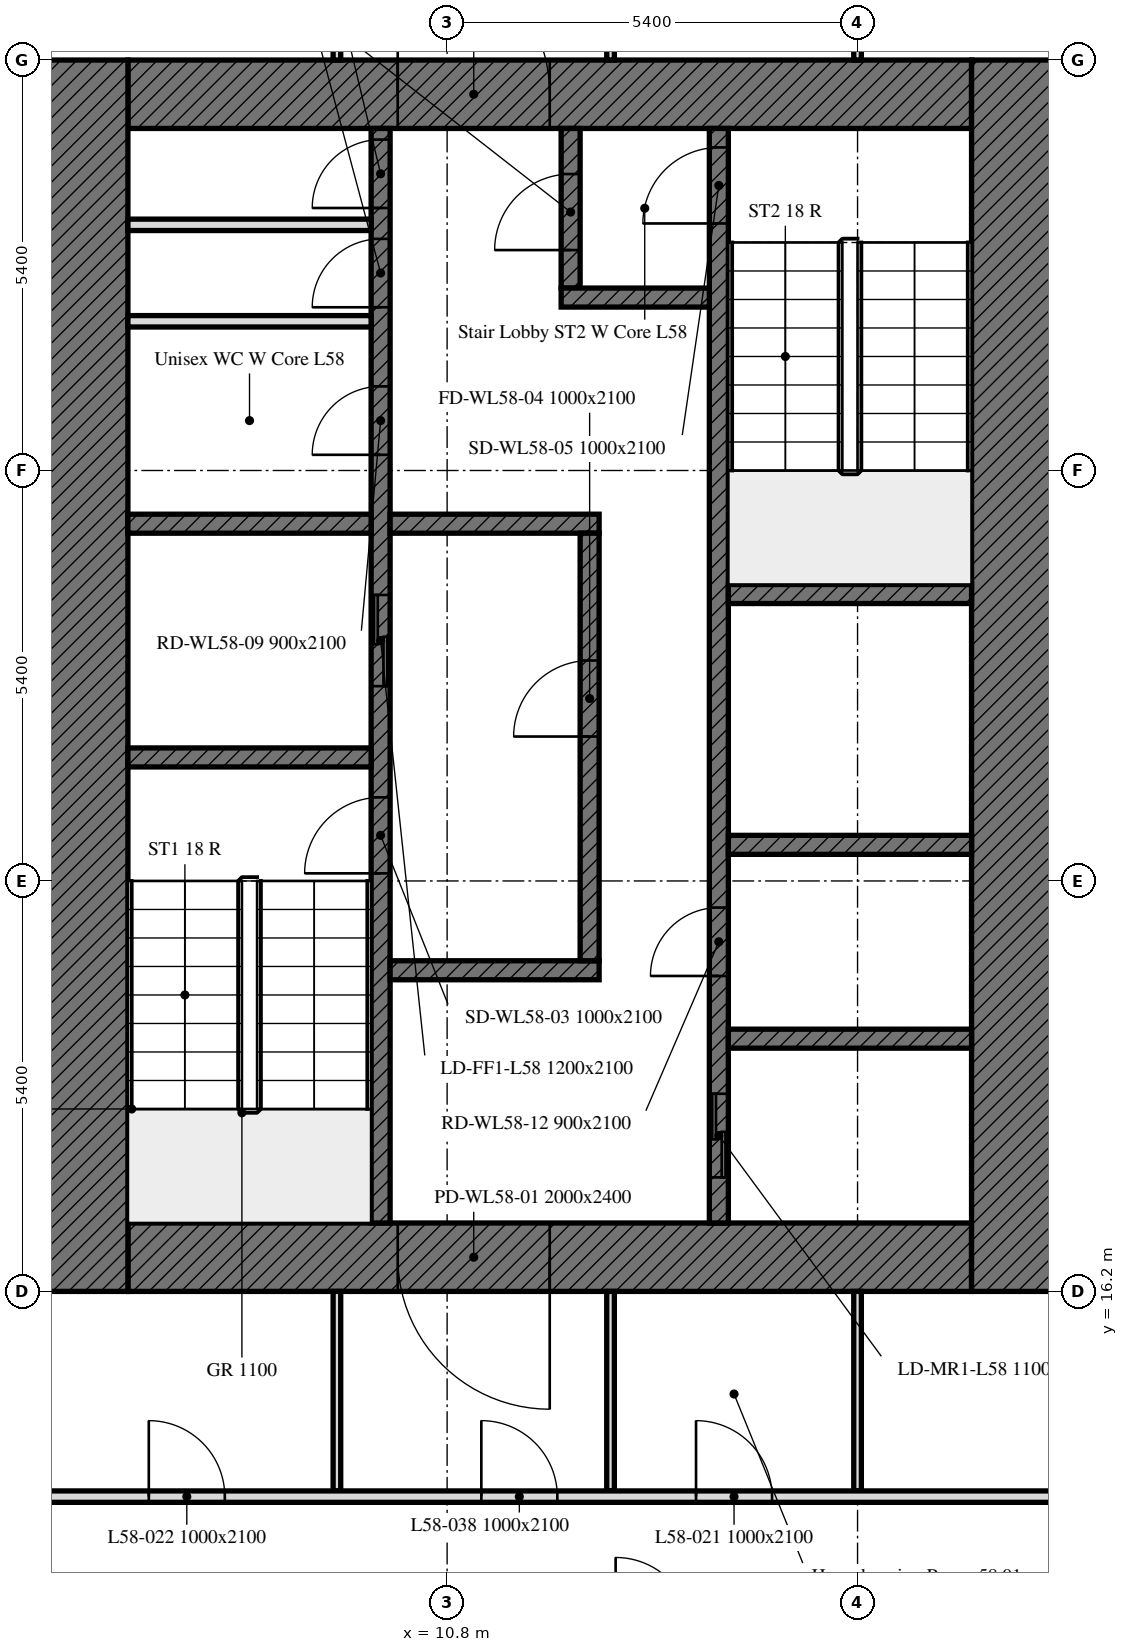
"""IFC4 building model, lengths in metres.
Left out: names, types, materials, properties, quantities, classifications, styles, units other than length and angle.
Written with IfcOpenShell. Run it as: python <this file> out.ifc"""

import sys

from ifc_helpers import new_model, si_unit, direction, frame, frame_2d, origin, place, context, subcontext, project, spatial, rectangle, extrude, element, fill, save


model = new_model("IFC4")
c1 = context("Model", 3, precision=1e-05, world=origin(), true_north=direction((0.0, 1.0)))
c2 = subcontext(c1, "Body", "Model", "MODEL_VIEW")
j1 = project(units=[si_unit("LENGTHUNIT", "METRE"), si_unit("PLANEANGLEUNIT", "RADIAN")], contexts=[c1])
p1 = place(None, origin())
s1 = spatial("IfcSite", under=j1, at=p1, CompositionType="ELEMENT")
p2 = place(p1, origin())
s2 = spatial("IfcBuilding", under=s1, at=p2, CompositionType="ELEMENT")
p3 = place(p2, frame((0.0, 0.0, 230.2)))
s3 = spatial("IfcBuildingStorey", under=s2, at=p3, CompositionType="ELEMENT", Elevation=230.2)
p4 = place(p3, frame((17.7, 16.65, 0.0), z_axis=(0.0, 0.0, 1.0), x_axis=(-1.0, 0.0, 0.0)))
e1 = element("IfcWall", 1, at=p4, inside=s3, PredefinedType="SOLIDWALL", context=c2, shape_type="SweptSolid", body=[
    extrude(rectangle(XDim=11.1, YDim=0.9, at=frame_2d((5.55, 0.0))), origin(), (0.0, 0.0, 1.0), 2.8),
])
p5 = place(p4, frame((5.55, 0.0, 0.0)))
e2 = element("IfcOpeningElement", 2, at=p5, cuts=e1, PredefinedType="OPENING", context=c2, shape_type="SweptSolid", body=[
    extrude(rectangle(XDim=2.0, YDim=2.4, at=frame_2d((1.0, 1.2))), frame((0.0, 0.45, 0.0), z_axis=(0.0, -1.0, 0.0), x_axis=(1.0, 0.0, 0.0)), (0.0, 0.0, 1.0), 0.9),
])
p6 = place(p3, frame((6.6, 31.95, 0.0), z_axis=(0.0, 0.0, 1.0), x_axis=(1.0, 0.0, 0.0)))
e3 = element("IfcWall", 3, at=p6, inside=s3, PredefinedType="SOLIDWALL", context=c2, shape_type="SweptSolid", body=[
    extrude(rectangle(XDim=11.1, YDim=0.9, at=frame_2d((5.55, 0.0))), origin(), (0.0, 0.0, 1.0), 2.8),
])
p7 = place(p6, frame((3.55, 0.0, 0.0)))
e4 = element("IfcOpeningElement", 4, at=p7, cuts=e3, PredefinedType="OPENING", context=c2, shape_type="SweptSolid", body=[
    extrude(rectangle(XDim=2.0, YDim=2.4, at=frame_2d((1.0, 1.2))), frame((0.0, 0.45, 0.0), z_axis=(0.0, -1.0, 0.0), x_axis=(1.0, 0.0, 0.0)), (0.0, 0.0, 1.0), 0.9),
])
for number, where, z_axis, x_axis in (
    (5, (6.0, 16.2, 0.0), (0.0, 0.0, 1.0), (0.0, 1.0, 0.0)),
    (6, (18.3, 32.4, 0.0), (0.0, 0.0, 1.0), (0.0, -1.0, 0.0)),
):
    element("IfcWall", number, at=place(p3, frame(where, z_axis=z_axis, x_axis=x_axis)), inside=s3, PredefinedType="SOLIDWALL", context=c2, shape_type="SweptSolid", body=[
        extrude(rectangle(XDim=16.2, YDim=1.2, at=frame_2d((8.1, 0.0))), origin(), (0.0, 0.0, 1.0), 2.8),
    ])
p8 = place(p3, frame((9.925, 17.1, 0.0), z_axis=(0.0, 0.0, 1.0), x_axis=(0.0, 1.0, 0.0)))
e7 = element("IfcWall", 7, at=p8, inside=s3, PredefinedType="SOLIDWALL", context=c2, shape_type="SweptSolid", body=[
    extrude(rectangle(XDim=14.4, YDim=0.25, at=frame_2d((7.2, 0.0))), origin(), (0.0, 0.0, 1.0), 2.8),
])
p9 = place(p8, frame((4.6, 0.0, 0.0)))
e8 = element("IfcOpeningElement", 8, at=p9, cuts=e7, PredefinedType="OPENING", context=c2, shape_type="SweptSolid", body=[
    extrude(rectangle(XDim=1.0, YDim=2.1, at=frame_2d((0.5, 1.05))), frame((0.0, 0.125, 0.0), z_axis=(0.0, -1.0, 0.0), x_axis=(1.0, 0.0, 0.0)), (0.0, 0.0, 1.0), 0.25),
])
p10 = place(p8, frame((7.062, 0.0, 0.0)))
e9 = element("IfcOpeningElement", 9, at=p10, cuts=e7, PredefinedType="OPENING", context=c2, shape_type="SweptSolid", body=[
    extrude(rectangle(XDim=1.2, YDim=2.1, at=frame_2d((0.6, 1.05))), frame((0.0, 0.125, 0.0), z_axis=(0.0, -1.0, 0.0), x_axis=(1.0, 0.0, 0.0)), (0.0, 0.0, 1.0), 0.25),
])
p11 = place(p8, frame((10.106, 0.0, 0.0)))
e10 = element("IfcOpeningElement", 10, at=p11, cuts=e7, PredefinedType="OPENING", context=c2, shape_type="SweptSolid", body=[
    extrude(rectangle(XDim=0.9, YDim=2.1, at=frame_2d((0.45, 1.05))), frame((0.0, 0.125, 0.0), z_axis=(0.0, -1.0, 0.0), x_axis=(1.0, 0.0, 0.0)), (0.0, 0.0, 1.0), 0.25),
])
p12 = place(p8, frame((12.048, 0.0, 0.0)))
e11 = element("IfcOpeningElement", 11, at=p12, cuts=e7, PredefinedType="OPENING", context=c2, shape_type="SweptSolid", body=[
    extrude(rectangle(XDim=0.9, YDim=2.1, at=frame_2d((0.45, 1.05))), frame((0.0, 0.125, 0.0), z_axis=(0.0, -1.0, 0.0), x_axis=(1.0, 0.0, 0.0)), (0.0, 0.0, 1.0), 0.25),
])
p13 = place(p8, frame((13.354, 0.0, 0.0)))
e12 = element("IfcOpeningElement", 12, at=p13, cuts=e7, PredefinedType="OPENING", context=c2, shape_type="SweptSolid", body=[
    extrude(rectangle(XDim=0.9, YDim=2.1, at=frame_2d((0.45, 1.05))), frame((0.0, 0.125, 0.0), z_axis=(0.0, -1.0, 0.0), x_axis=(1.0, 0.0, 0.0)), (0.0, 0.0, 1.0), 0.25),
])
p14 = place(p3, frame((14.375, 17.1, 0.0), z_axis=(0.0, 0.0, 1.0), x_axis=(0.0, 1.0, 0.0)))
e13 = element("IfcWall", 13, at=p14, inside=s3, PredefinedType="SOLIDWALL", context=c2, shape_type="SweptSolid", body=[
    extrude(rectangle(XDim=14.4, YDim=0.25, at=frame_2d((7.2, 0.0))), origin(), (0.0, 0.0, 1.0), 2.8),
])
p15 = place(p14, frame((13.15, 0.0, 0.0)))
e14 = element("IfcOpeningElement", 14, at=p15, cuts=e13, PredefinedType="OPENING", context=c2, shape_type="SweptSolid", body=[
    extrude(rectangle(XDim=1.0, YDim=2.1, at=frame_2d((0.5, 1.05))), frame((0.0, 0.125, 0.0), z_axis=(0.0, -1.0, 0.0), x_axis=(1.0, 0.0, 0.0)), (0.0, 0.0, 1.0), 0.25),
])
p16 = place(p14, frame((0.6, 0.0, 0.0)))
e15 = element("IfcOpeningElement", 15, at=p16, cuts=e13, PredefinedType="OPENING", context=c2, shape_type="SweptSolid", body=[
    extrude(rectangle(XDim=1.1, YDim=2.1, at=frame_2d((0.55, 1.05))), frame((0.0, 0.125, 0.0), z_axis=(0.0, -1.0, 0.0), x_axis=(1.0, 0.0, 0.0)), (0.0, 0.0, 1.0), 0.25),
])
p17 = place(p14, frame((3.25, 0.0, 0.0)))
e16 = element("IfcOpeningElement", 16, at=p17, cuts=e13, PredefinedType="OPENING", context=c2, shape_type="SweptSolid", body=[
    extrude(rectangle(XDim=0.9, YDim=2.1, at=frame_2d((0.45, 1.05))), frame((0.0, 0.125, 0.0), z_axis=(0.0, -1.0, 0.0), x_axis=(1.0, 0.0, 0.0)), (0.0, 0.0, 1.0), 0.25),
])
for number, where, z_axis, x_axis in (
    (17, (6.6, 23.225, 0.0), (0.0, 0.0, 1.0), (1.0, 0.0, 0.0)),
    (18, (14.5, 25.375, 0.0), (0.0, 0.0, 1.0), (1.0, 0.0, 0.0)),
    (19, (14.5, 22.075, 0.0), (0.0, 0.0, 1.0), (1.0, 0.0, 0.0)),
    (20, (6.6, 26.3, 0.0), (0.0, 0.0, 1.0), (1.0, 0.0, 0.0)),
):
    element("IfcWall", number, at=place(p3, frame(where, z_axis=z_axis, x_axis=x_axis)), inside=s3, PredefinedType="SOLIDWALL", context=c2, shape_type="SweptSolid", body=[
        extrude(rectangle(XDim=3.2, YDim=0.25, at=frame_2d((1.6, 0.0))), origin(), (0.0, 0.0, 1.0), 2.8),
    ])
for number, where, z_axis, x_axis in (
    (21, (10.05, 26.3, 0.0), (0.0, 0.0, 1.0), (1.0, 0.0, 0.0)),
    (22, (10.05, 20.425, 0.0), (0.0, 0.0, 1.0), (1.0, 0.0, 0.0)),
):
    element("IfcWall", number, at=place(p3, frame(where, z_axis=z_axis, x_axis=x_axis)), inside=s3, PredefinedType="SOLIDWALL", context=c2, shape_type="SweptSolid", body=[
        extrude(rectangle(XDim=2.75, YDim=0.25, at=frame_2d((1.375, 0.0))), origin(), (0.0, 0.0, 1.0), 2.8),
    ])
p18 = place(p3, frame((12.425, 29.4, 0.0), z_axis=(0.0, 0.0, 1.0), x_axis=(0.0, 1.0, 0.0)))
e23 = element("IfcWall", 23, at=p18, inside=s3, PredefinedType="SOLIDWALL", context=c2, shape_type="SweptSolid", body=[
    extrude(rectangle(XDim=2.1, YDim=0.25, at=frame_2d((1.05, 0.0))), origin(), (0.0, 0.0, 1.0), 2.8),
])
p19 = place(p18, frame((0.5, 0.0, 0.0)))
e24 = element("IfcOpeningElement", 24, at=p19, cuts=e23, PredefinedType="OPENING", context=c2, shape_type="SweptSolid", body=[
    extrude(rectangle(XDim=1.0, YDim=2.1, at=frame_2d((0.5, 1.05))), frame((0.0, 0.125, 0.0), z_axis=(0.0, -1.0, 0.0), x_axis=(1.0, 0.0, 0.0)), (0.0, 0.0, 1.0), 0.25),
])
p20 = place(p3, frame((12.3, 29.275, 0.0), z_axis=(0.0, 0.0, 1.0), x_axis=(1.0, 0.0, 0.0)))
e25 = element("IfcWall", 25, at=p20, inside=s3, PredefinedType="SOLIDWALL", context=c2, shape_type="SweptSolid", body=[
    extrude(rectangle(XDim=1.95, YDim=0.25, at=frame_2d((0.975, 0.0))), origin(), (0.0, 0.0, 1.0), 2.8),
])
p21 = place(p3, frame((12.675, 20.55, 0.0), z_axis=(0.0, 0.0, 1.0), x_axis=(0.0, 1.0, 0.0)))
e26 = element("IfcWall", 26, at=p21, inside=s3, PredefinedType="SOLIDWALL", context=c2, shape_type="SweptSolid", body=[
    extrude(rectangle(XDim=5.625, YDim=0.25, at=frame_2d((2.812, 0.0))), origin(), (0.0, 0.0, 1.0), 2.8),
])
p22 = place(p21, frame((2.95, 0.0, 0.0)))
e27 = element("IfcOpeningElement", 27, at=p22, cuts=e26, PredefinedType="OPENING", context=c2, shape_type="SweptSolid", body=[
    extrude(rectangle(XDim=1.0, YDim=2.1, at=frame_2d((0.5, 1.05))), frame((0.0, 0.125, 0.0), z_axis=(0.0, -1.0, 0.0), x_axis=(1.0, 0.0, 0.0)), (0.0, 0.0, 1.0), 0.25),
])
p23 = place(p3, frame((14.5, 19.525, 0.0), z_axis=(0.0, 0.0, 1.0), x_axis=(1.0, 0.0, 0.0)))
e28 = element("IfcWall", 28, at=p23, inside=s3, PredefinedType="SOLIDWALL", context=c2, shape_type="SweptSolid", body=[
    extrude(rectangle(XDim=3.2, YDim=0.25, at=frame_2d((1.6, 0.0))), origin(), (0.0, 0.0, 1.0), 2.8),
])
for number, where, z_axis, x_axis in (
    (29, (6.6, 28.963, 0.0), (0.0, 0.0, 1.0), (1.0, 0.0, 0.0)),
    (30, (6.6, 30.232, 0.0), (0.0, 0.0, 1.0), (1.0, 0.0, 0.0)),
):
    element("IfcWall", number, at=place(p3, frame(where, z_axis=z_axis, x_axis=x_axis)), inside=s3, PredefinedType="PARTITIONING", context=c2, shape_type="SweptSolid", body=[
        extrude(rectangle(XDim=3.2, YDim=0.15, at=frame_2d((1.6, 0.0))), origin(), (0.0, 0.0, 1.0), 2.8),
    ])
p24 = place(p3, frame((16.2, 37.405, 0.0), z_axis=(0.0, 0.0, 1.0), x_axis=(0.0, -1.0, 0.0)))
e31 = element("IfcWall", 31, at=p24, inside=s3, PredefinedType="PARTITIONING", context=c2, shape_type="SweptSolid", body=[
    extrude(rectangle(XDim=5.005, YDim=0.1, at=frame_2d((2.502, 0.0))), origin(), (0.0, 0.0, 1.0), 2.2),
])
for number, where, z_axis, x_axis in (
    (32, (12.95, 32.4, 0.0), (0.0, 0.0, 1.0), (0.0, 1.0, 0.0)),
    (33, (9.35, 40.425, 0.0), (0.0, 0.0, 1.0), (0.0, -1.0, 0.0)),
):
    element("IfcWall", number, at=place(p3, frame(where, z_axis=z_axis, x_axis=x_axis)), inside=s3, PredefinedType="PARTITIONING", context=c2, shape_type="SweptSolid", body=[
        extrude(rectangle(XDim=8.025, YDim=0.1, at=frame_2d((4.013, 0.0))), origin(), (0.0, 0.0, 1.0), 2.2),
    ])
p25 = place(p3, frame((16.2, 16.2, 0.0), z_axis=(0.0, 0.0, 1.0), x_axis=(0.0, -1.0, 0.0)))
e34 = element("IfcWall", 34, at=p25, inside=s3, PredefinedType="PARTITIONING", context=c2, shape_type="SweptSolid", body=[
    extrude(rectangle(XDim=2.625, YDim=0.1, at=frame_2d((1.312, 0.0))), origin(), (0.0, 0.0, 1.0), 2.2),
])
for number, where, z_axis, x_axis in (
    (35, (12.95, 13.575, 0.0), (0.0, 0.0, 1.0), (0.0, 1.0, 0.0)),
    (36, (9.35, 16.2, 0.0), (0.0, 0.0, 1.0), (0.0, -1.0, 0.0)),
):
    element("IfcWall", number, at=place(p3, frame(where, z_axis=z_axis, x_axis=x_axis)), inside=s3, PredefinedType="PARTITIONING", context=c2, shape_type="SweptSolid", body=[
        extrude(rectangle(XDim=2.625, YDim=0.1, at=frame_2d((1.312, 0.0))), origin(), (0.0, 0.0, 1.0), 2.8),
    ])
p26 = place(p3, frame((5.325, 13.5, 0.0), z_axis=(0.0, 0.0, 1.0), x_axis=(1.0, 0.0, 0.0)))
e37 = element("IfcWall", 37, at=p26, inside=s3, PredefinedType="PARTITIONING", context=c2, shape_type="SweptSolid", body=[
    extrude(rectangle(XDim=37.124, YDim=0.15, at=frame_2d((18.562, 0.0))), origin(), (0.0, 0.0, 1.0), 2.2),
])
p27 = place(p26, frame((18.475, 0.0, 0.0)))
e38 = element("IfcOpeningElement", 38, at=p27, cuts=e37, PredefinedType="OPENING", context=c2, shape_type="SweptSolid", body=[
    extrude(rectangle(XDim=1.0, YDim=2.1, at=frame_2d((0.5, 1.05))), frame((0.0, 0.075, 0.0), z_axis=(0.0, -1.0, 0.0), x_axis=(1.0, 0.0, 0.0)), (0.0, 0.0, 1.0), 0.15),
])
p28 = place(p26, frame((34.095, 0.0, 0.0)))
e39 = element("IfcOpeningElement", 39, at=p28, cuts=e37, PredefinedType="OPENING", context=c2, shape_type="SweptSolid", body=[
    extrude(rectangle(XDim=1.0, YDim=2.1, at=frame_2d((0.5, 1.05))), frame((0.0, 0.075, 0.0), z_axis=(0.0, -1.0, 0.0), x_axis=(1.0, 0.0, 0.0)), (0.0, 0.0, 1.0), 0.15),
])
p29 = place(p26, frame((8.75, 0.0, 0.0)))
e40 = element("IfcOpeningElement", 40, at=p29, cuts=e37, PredefinedType="OPENING", context=c2, shape_type="SweptSolid", body=[
    extrude(rectangle(XDim=1.0, YDim=2.1, at=frame_2d((0.5, 1.05))), frame((0.0, 0.075, 0.0), z_axis=(0.0, -1.0, 0.0), x_axis=(1.0, 0.0, 0.0)), (0.0, 0.0, 1.0), 0.15),
])
p30 = place(p26, frame((1.55, 0.0, 0.0)))
e41 = element("IfcOpeningElement", 41, at=p30, cuts=e37, PredefinedType="OPENING", context=c2, shape_type="SweptSolid", body=[
    extrude(rectangle(XDim=1.0, YDim=2.1, at=frame_2d((0.5, 1.05))), frame((0.0, 0.075, 0.0), z_axis=(0.0, -1.0, 0.0), x_axis=(1.0, 0.0, 0.0)), (0.0, 0.0, 1.0), 0.15),
])
p31 = place(p26, frame((28.2, 0.0, 0.0)))
e42 = element("IfcOpeningElement", 42, at=p31, cuts=e37, PredefinedType="OPENING", context=c2, shape_type="SweptSolid", body=[
    extrude(rectangle(XDim=1.0, YDim=2.1, at=frame_2d((0.5, 1.05))), frame((0.0, 0.075, 0.0), z_axis=(0.0, -1.0, 0.0), x_axis=(1.0, 0.0, 0.0)), (0.0, 0.0, 1.0), 0.15),
])
p32 = place(p26, frame((30.625, 0.0, 0.0)))
e43 = element("IfcOpeningElement", 43, at=p32, cuts=e37, PredefinedType="OPENING", context=c2, shape_type="SweptSolid", body=[
    extrude(rectangle(XDim=1.8, YDim=2.4, at=frame_2d((0.9, 1.2))), frame((0.0, 0.075, 0.0), z_axis=(0.0, -1.0, 0.0), x_axis=(1.0, 0.0, 0.0)), (0.0, 0.0, 1.0), 0.15),
])
p33 = place(p26, frame((5.925, 0.0, 0.0)))
e44 = element("IfcOpeningElement", 44, at=p33, cuts=e37, PredefinedType="OPENING", context=c2, shape_type="SweptSolid", body=[
    extrude(rectangle(XDim=1.0, YDim=2.1, at=frame_2d((0.5, 1.05))), frame((0.0, 0.075, 0.0), z_axis=(0.0, -1.0, 0.0), x_axis=(1.0, 0.0, 0.0)), (0.0, 0.0, 1.0), 0.15),
])
p34 = place(p5, origin())
e45 = element("IfcDoor", 45, at=p34, inside=s3, OperationType="DOUBLE_DOOR_SINGLE_SWING", PredefinedType="DOOR", context=c2, shape_type="SweptSolid", body=[
    extrude(rectangle(XDim=2.0, YDim=2.4, at=frame_2d((1.0, 1.2))), frame((0.0, 0.025, 0.0), z_axis=(0.0, -1.0, 0.0), x_axis=(1.0, 0.0, 0.0)), (0.0, 0.0, 1.0), 0.05),
])
fill(e2, e45)
p35 = place(p7, origin())
e46 = element("IfcDoor", 46, at=p35, inside=s3, OperationType="DOUBLE_DOOR_SINGLE_SWING", PredefinedType="DOOR", context=c2, shape_type="SweptSolid", body=[
    extrude(rectangle(XDim=2.0, YDim=2.4, at=frame_2d((1.0, 1.2))), frame((0.0, 0.025, 0.0), z_axis=(0.0, -1.0, 0.0), x_axis=(1.0, 0.0, 0.0)), (0.0, 0.0, 1.0), 0.05),
])
fill(e4, e46)
p36 = place(p9, origin())
e47 = element("IfcDoor", 47, at=p36, inside=s3, OperationType="SINGLE_SWING_LEFT", PredefinedType="DOOR", context=c2, shape_type="SweptSolid", body=[
    extrude(rectangle(XDim=1.0, YDim=2.1, at=frame_2d((0.5, 1.05))), frame((0.0, 0.025, 0.0), z_axis=(0.0, -1.0, 0.0), x_axis=(1.0, 0.0, 0.0)), (0.0, 0.0, 1.0), 0.05),
])
fill(e8, e47)
p37 = place(p22, origin())
e48 = element("IfcDoor", 48, at=p37, inside=s3, OperationType="SINGLE_SWING_LEFT", PredefinedType="DOOR", context=c2, shape_type="SweptSolid", body=[
    extrude(rectangle(XDim=1.0, YDim=2.1, at=frame_2d((0.5, 1.05))), frame((0.0, 0.025, 0.0), z_axis=(0.0, -1.0, 0.0), x_axis=(1.0, 0.0, 0.0)), (0.0, 0.0, 1.0), 0.05),
])
fill(e27, e48)
p38 = place(p15, origin())
e49 = element("IfcDoor", 49, at=p38, inside=s3, OperationType="SINGLE_SWING_LEFT", PredefinedType="DOOR", context=c2, shape_type="SweptSolid", body=[
    extrude(rectangle(XDim=1.0, YDim=2.1, at=frame_2d((0.5, 1.05))), frame((0.0, 0.025, 0.0), z_axis=(0.0, -1.0, 0.0), x_axis=(1.0, 0.0, 0.0)), (0.0, 0.0, 1.0), 0.05),
])
fill(e14, e49)
p39 = place(p19, origin())
e50 = element("IfcDoor", 50, at=p39, inside=s3, OperationType="SINGLE_SWING_LEFT", PredefinedType="DOOR", context=c2, shape_type="SweptSolid", body=[
    extrude(rectangle(XDim=1.0, YDim=2.1, at=frame_2d((0.5, 1.05))), frame((0.0, 0.025, 0.0), z_axis=(0.0, -1.0, 0.0), x_axis=(1.0, 0.0, 0.0)), (0.0, 0.0, 1.0), 0.05),
])
fill(e24, e50)
p40 = place(p10, origin())
e51 = element("IfcDoor", 51, at=p40, inside=s3, OperationType="DOUBLE_DOOR_SLIDING", PredefinedType="DOOR", context=c2, shape_type="SweptSolid", body=[
    extrude(rectangle(XDim=1.2, YDim=2.1, at=frame_2d((0.6, 1.05))), frame((0.0, 0.025, 0.0), z_axis=(0.0, -1.0, 0.0), x_axis=(1.0, 0.0, 0.0)), (0.0, 0.0, 1.0), 0.05),
])
fill(e9, e51)
p41 = place(p16, origin())
e52 = element("IfcDoor", 52, at=p41, inside=s3, OperationType="DOUBLE_DOOR_SLIDING", PredefinedType="DOOR", context=c2, shape_type="SweptSolid", body=[
    extrude(rectangle(XDim=1.1, YDim=2.1, at=frame_2d((0.55, 1.05))), frame((0.0, 0.025, 0.0), z_axis=(0.0, -1.0, 0.0), x_axis=(1.0, 0.0, 0.0)), (0.0, 0.0, 1.0), 0.05),
])
fill(e15, e52)
p42 = place(p11, origin())
e53 = element("IfcDoor", 53, at=p42, inside=s3, OperationType="SINGLE_SWING_LEFT", PredefinedType="DOOR", context=c2, shape_type="SweptSolid", body=[
    extrude(rectangle(XDim=0.9, YDim=2.1, at=frame_2d((0.45, 1.05))), frame((0.0, 0.025, 0.0), z_axis=(0.0, -1.0, 0.0), x_axis=(1.0, 0.0, 0.0)), (0.0, 0.0, 1.0), 0.05),
])
fill(e10, e53)
p43 = place(p12, origin())
e54 = element("IfcDoor", 54, at=p43, inside=s3, OperationType="SINGLE_SWING_LEFT", PredefinedType="DOOR", context=c2, shape_type="SweptSolid", body=[
    extrude(rectangle(XDim=0.9, YDim=2.1, at=frame_2d((0.45, 1.05))), frame((0.0, 0.025, 0.0), z_axis=(0.0, -1.0, 0.0), x_axis=(1.0, 0.0, 0.0)), (0.0, 0.0, 1.0), 0.05),
])
fill(e11, e54)
p44 = place(p13, origin())
e55 = element("IfcDoor", 55, at=p44, inside=s3, OperationType="SINGLE_SWING_LEFT", PredefinedType="DOOR", context=c2, shape_type="SweptSolid", body=[
    extrude(rectangle(XDim=0.9, YDim=2.1, at=frame_2d((0.45, 1.05))), frame((0.0, 0.025, 0.0), z_axis=(0.0, -1.0, 0.0), x_axis=(1.0, 0.0, 0.0)), (0.0, 0.0, 1.0), 0.05),
])
fill(e12, e55)
p45 = place(p17, origin())
e56 = element("IfcDoor", 56, at=p45, inside=s3, OperationType="SINGLE_SWING_LEFT", PredefinedType="DOOR", context=c2, shape_type="SweptSolid", body=[
    extrude(rectangle(XDim=0.9, YDim=2.1, at=frame_2d((0.45, 1.05))), frame((0.0, 0.025, 0.0), z_axis=(0.0, -1.0, 0.0), x_axis=(1.0, 0.0, 0.0)), (0.0, 0.0, 1.0), 0.05),
])
fill(e16, e56)
p46 = place(p29, origin())
e57 = element("IfcDoor", 57, at=p46, inside=s3, OperationType="SINGLE_SWING_LEFT", PredefinedType="DOOR", context=c2, shape_type="SweptSolid", body=[
    extrude(rectangle(XDim=1.0, YDim=2.1, at=frame_2d((0.5, 1.05))), frame((0.0, 0.025, 0.0), z_axis=(0.0, -1.0, 0.0), x_axis=(1.0, 0.0, 0.0)), (0.0, 0.0, 1.0), 0.05),
])
fill(e40, e57)
p47 = place(p30, origin())
e58 = element("IfcDoor", 58, at=p47, inside=s3, OperationType="SINGLE_SWING_RIGHT", PredefinedType="DOOR", context=c2, shape_type="SweptSolid", body=[
    extrude(rectangle(XDim=1.0, YDim=2.1, at=frame_2d((0.5, 1.05))), frame((0.0, 0.025, 0.0), z_axis=(0.0, -1.0, 0.0), x_axis=(1.0, 0.0, 0.0)), (0.0, 0.0, 1.0), 0.05),
])
fill(e41, e58)
p48 = place(p33, origin())
e59 = element("IfcDoor", 59, at=p48, inside=s3, OperationType="SINGLE_SWING_LEFT", PredefinedType="DOOR", context=c2, shape_type="SweptSolid", body=[
    extrude(rectangle(XDim=1.0, YDim=2.1, at=frame_2d((0.5, 1.05))), frame((0.0, 0.025, 0.0), z_axis=(0.0, -1.0, 0.0), x_axis=(1.0, 0.0, 0.0)), (0.0, 0.0, 1.0), 0.05),
])
fill(e44, e59)
save(model, sys.argv[1])
